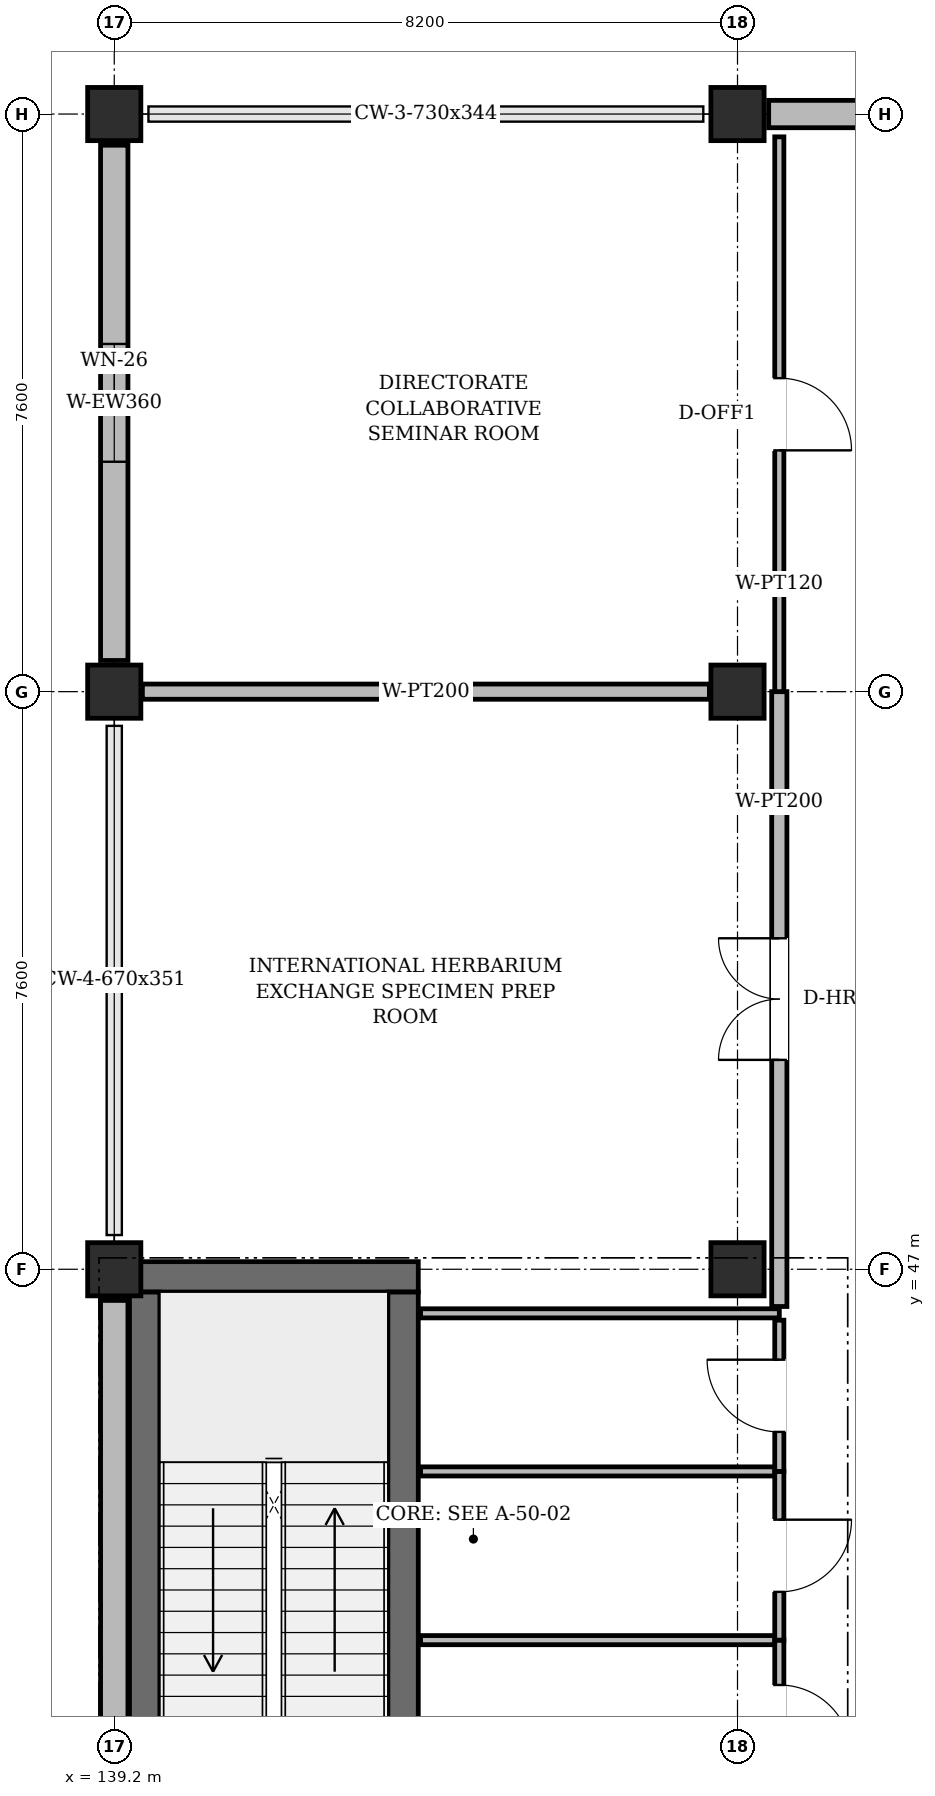
"""IFC4 building model, lengths in metres.
Left out: names, types, materials, properties, quantities, classifications, styles, units other than length and angle.
Written with IfcOpenShell. Run it as: python <this file> out.ifc"""

import sys

from ifc_helpers import new_model, si_unit, direction, frame, frame_2d, origin, origin_2d, place, context, subcontext, project, spatial, rectangle, extrude, element, fill, save


model = new_model("IFC4")
c1 = context("Model", 3, precision=1e-05, world=origin(), true_north=direction((0.0, 1.0)))
c2 = subcontext(c1, "Body", "Model", "MODEL_VIEW")
j1 = project(units=[si_unit("LENGTHUNIT", "METRE"), si_unit("PLANEANGLEUNIT", "RADIAN")], contexts=[c1])
p1 = place(None, origin())
s1 = spatial("IfcSite", under=j1, at=p1, CompositionType="ELEMENT")
p2 = place(p1, origin())
s2 = spatial("IfcBuilding", under=s1, at=p2, CompositionType="ELEMENT")
p3 = place(p2, frame((0.0, 0.0, 61.8)))
s3 = spatial("IfcBuildingStorey", under=s2, at=p3, CompositionType="ELEMENT", Elevation=61.8)
p4 = place(p3, frame((139.2, 47.0, 0.0), z_axis=(0.0, 0.0, 1.0), x_axis=(1.0, 0.0, 0.0)))
e1 = element("IfcColumn", 1, at=p4, inside=s3, PredefinedType="COLUMN", context=c2, shape_type="SweptSolid", body=[
    extrude(rectangle(XDim=0.7, YDim=0.7, at=origin_2d()), origin(), (0.0, 0.0, 1.0), 4.11),
])
for number, where, z_axis, x_axis in (
    (2, (139.2, 54.6, 0.0), (0.0, 0.0, 1.0), (1.0, 0.0, 0.0)),
    (3, (139.2, 62.2, 0.0), (0.0, 0.0, 1.0), (1.0, 0.0, 0.0)),
):
    element("IfcColumn", number, at=place(p3, frame(where, z_axis=z_axis, x_axis=x_axis)), inside=s3, PredefinedType="COLUMN", context=c2, shape_type="SweptSolid", body=[
        extrude(rectangle(XDim=0.7, YDim=0.7, at=origin_2d()), origin(), (0.0, 0.0, 1.0), 4.04),
    ])
p5 = place(p3, frame((147.4, 47.0, 0.0), z_axis=(0.0, 0.0, 1.0), x_axis=(1.0, 0.0, 0.0)))
e4 = element("IfcColumn", 4, at=p5, inside=s3, PredefinedType="COLUMN", context=c2, shape_type="SweptSolid", body=[
    extrude(rectangle(XDim=0.7, YDim=0.7, at=origin_2d()), origin(), (0.0, 0.0, 1.0), 4.11),
])
for number, where, z_axis, x_axis in (
    (5, (147.4, 54.6, 0.0), (0.0, 0.0, 1.0), (1.0, 0.0, 0.0)),
    (6, (147.4, 62.2, 0.0), (0.0, 0.0, 1.0), (1.0, 0.0, 0.0)),
):
    element("IfcColumn", number, at=place(p3, frame(where, z_axis=z_axis, x_axis=x_axis)), inside=s3, PredefinedType="COLUMN", context=c2, shape_type="SweptSolid", body=[
        extrude(rectangle(XDim=0.7, YDim=0.7, at=origin_2d()), origin(), (0.0, 0.0, 1.0), 4.04),
    ])
p6 = place(p3, frame((155.19, 62.2, 0.0), z_axis=(0.0, 0.0, 1.0), x_axis=(-1.0, 0.0, 0.0)))
e7 = element("IfcWall", 7, at=p6, inside=s3, PredefinedType="SOLIDWALL", context=c2, shape_type="SweptSolid", body=[
    extrude(rectangle(XDim=7.38, YDim=0.36, at=frame_2d((3.69, 0.0))), origin(), (0.0, 0.0, 1.0), 3.425),
])
p7 = place(p6, frame((2.365, 0.0, 0.95)))
e8 = element("IfcOpeningElement", 8, at=p7, cuts=e7, PredefinedType="OPENING", context=c2, shape_type="SweptSolid", body=[
    extrude(rectangle(XDim=2.65, YDim=2.05, at=frame_2d((1.325, 1.025))), frame((0.0, 0.192, 0.0), z_axis=(0.0, -1.0, 0.0), x_axis=(1.0, 0.0, 0.0)), (0.0, 0.0, 1.0), 0.384),
])
p8 = place(p3, frame((139.2, 61.79, 0.0), z_axis=(0.0, 0.0, 1.0), x_axis=(0.0, -1.0, 0.0)))
e9 = element("IfcWall", 9, at=p8, inside=s3, PredefinedType="SOLIDWALL", context=c2, shape_type="SweptSolid", body=[
    extrude(rectangle(XDim=6.78, YDim=0.36, at=frame_2d((3.39, 0.0))), origin(), (0.0, 0.0, 1.0), 3.425),
])
p9 = place(p8, frame((2.615, 0.0, 0.95)))
e10 = element("IfcOpeningElement", 10, at=p9, cuts=e9, PredefinedType="OPENING", context=c2, shape_type="SweptSolid", body=[
    extrude(rectangle(XDim=1.55, YDim=1.5, at=frame_2d((0.775, 0.75))), frame((0.0, 0.192, 0.0), z_axis=(0.0, -1.0, 0.0), x_axis=(1.0, 0.0, 0.0)), (0.0, 0.0, 1.0), 0.384),
])
p10 = place(p3, frame((139.2, 46.59, 0.0), z_axis=(0.0, 0.0, 1.0), x_axis=(0.0, -1.0, 0.0)))
e11 = element("IfcWall", 11, at=p10, inside=s3, PredefinedType="SOLIDWALL", context=c2, shape_type="SweptSolid", body=[
    extrude(rectangle(XDim=6.78, YDim=0.36, at=frame_2d((3.39, 0.0))), origin(), (0.0, 0.0, 1.0), 3.495),
])
p11 = place(p3, frame((139.4, 46.9, 0.0), z_axis=(0.0, 0.0, 1.0), x_axis=(1.0, 0.0, 0.0)))
e12 = element("IfcWall", 12, at=p11, inside=s3, PredefinedType="SHEAR", context=c2, shape_type="SweptSolid", body=[
    extrude(rectangle(XDim=3.8, YDim=0.4, at=frame_2d((1.9, 0.0))), origin(), (0.0, 0.0, 1.0), 4.11),
])
for number, where, z_axis, x_axis in (
    (13, (139.6, 39.7, 0.0), (0.0, 0.0, 1.0), (0.0, 1.0, 0.0)),
    (14, (143.0, 39.7, 0.0), (0.0, 0.0, 1.0), (0.0, 1.0, 0.0)),
):
    element("IfcWall", number, at=place(p3, frame(where, z_axis=z_axis, x_axis=x_axis)), inside=s3, PredefinedType="SHEAR", context=c2, shape_type="SweptSolid", body=[
        extrude(rectangle(XDim=7.0, YDim=0.4, at=frame_2d((3.5, 0.0))), origin(), (0.0, 0.0, 1.0), 4.11),
    ])
p12 = place(p3, frame((143.23, 46.42, 0.0), z_axis=(0.0, 0.0, 1.0), x_axis=(1.0, 0.0, 0.0)))
e15 = element("IfcWall", 15, at=p12, inside=s3, PredefinedType="PARTITIONING", context=c2, shape_type="SweptSolid", body=[
    extrude(rectangle(XDim=4.72, YDim=0.12, at=frame_2d((2.36, 0.0))), origin(), (0.0, 0.0, 1.0), 4.005),
])
p13 = place(p3, frame((143.23, 42.12, 0.0), z_axis=(0.0, 0.0, 1.0), x_axis=(1.0, 0.0, 0.0)))
e16 = element("IfcWall", 16, at=p13, inside=s3, PredefinedType="PARTITIONING", context=c2, shape_type="SweptSolid", body=[
    extrude(rectangle(XDim=4.72, YDim=0.12, at=frame_2d((2.36, 0.0))), origin(), (0.0, 0.0, 1.0), 3.585),
])
p14 = place(p3, frame((147.95, 42.12, 0.0), z_axis=(0.0, 0.0, 1.0), x_axis=(0.0, -1.0, 0.0)))
e17 = element("IfcWall", 17, at=p14, inside=s3, PredefinedType="PARTITIONING", context=c2, shape_type="SweptSolid", body=[
    extrude(rectangle(XDim=2.13, YDim=0.12, at=frame_2d((1.065, 0.0))), origin(), (0.0, 0.0, 1.0), 4.005),
])
p15 = place(p14, frame((0.59, 0.0, 0.0)))
e18 = element("IfcOpeningElement", 18, at=p15, cuts=e17, PredefinedType="OPENING", context=c2, shape_type="SweptSolid", body=[
    extrude(rectangle(XDim=0.95, YDim=2.15, at=frame_2d((0.475, 1.075))), frame((0.0, 0.072, 0.0), z_axis=(0.0, -1.0, 0.0), x_axis=(1.0, 0.0, 0.0)), (0.0, 0.0, 1.0), 0.144),
])
p16 = place(p3, frame((143.23, 44.34, 0.0), z_axis=(0.0, 0.0, 1.0), x_axis=(1.0, 0.0, 0.0)))
e19 = element("IfcWall", 19, at=p16, inside=s3, PredefinedType="PARTITIONING", context=c2, shape_type="SweptSolid", body=[
    extrude(rectangle(XDim=4.72, YDim=0.12, at=frame_2d((2.36, 0.0))), origin(), (0.0, 0.0, 1.0), 3.535),
])
p17 = place(p3, frame((147.95, 44.34, 0.0), z_axis=(0.0, 0.0, 1.0), x_axis=(0.0, -1.0, 0.0)))
e20 = element("IfcWall", 20, at=p17, inside=s3, PredefinedType="PARTITIONING", context=c2, shape_type="SweptSolid", body=[
    extrude(rectangle(XDim=2.22, YDim=0.12, at=frame_2d((1.11, 0.0))), origin(), (0.0, 0.0, 1.0), 4.005),
])
p18 = place(p17, frame((0.635, 0.0, 0.0)))
e21 = element("IfcOpeningElement", 21, at=p18, cuts=e20, PredefinedType="OPENING", context=c2, shape_type="SweptSolid", body=[
    extrude(rectangle(XDim=0.95, YDim=2.15, at=frame_2d((0.475, 1.075))), frame((0.0, 0.072, 0.0), z_axis=(0.0, -1.0, 0.0), x_axis=(1.0, 0.0, 0.0)), (0.0, 0.0, 1.0), 0.144),
])
p19 = place(p3, frame((147.95, 46.33, 0.0), z_axis=(0.0, 0.0, 1.0), x_axis=(0.0, -1.0, 0.0)))
e22 = element("IfcWall", 22, at=p19, inside=s3, PredefinedType="PARTITIONING", context=c2, shape_type="SweptSolid", body=[
    extrude(rectangle(XDim=1.99, YDim=0.12, at=frame_2d((0.995, 0.0))), origin(), (0.0, 0.0, 1.0), 4.005),
])
p20 = place(p19, frame((0.52, 0.0, 0.0)))
e23 = element("IfcOpeningElement", 23, at=p20, cuts=e22, PredefinedType="OPENING", context=c2, shape_type="SweptSolid", body=[
    extrude(rectangle(XDim=0.95, YDim=2.15, at=frame_2d((0.475, 1.075))), frame((0.0, 0.072, 0.0), z_axis=(0.0, -1.0, 0.0), x_axis=(1.0, 0.0, 0.0)), (0.0, 0.0, 1.0), 0.144),
])
p21 = place(p3, frame((147.95, 46.51, 0.0), z_axis=(0.0, 0.0, 1.0), x_axis=(0.0, 1.0, 0.0)))
e24 = element("IfcWall", 24, at=p21, inside=s3, PredefinedType="PARTITIONING", context=c2, shape_type="SweptSolid", body=[
    extrude(rectangle(XDim=8.09, YDim=0.2, at=frame_2d((4.045, 0.0))), origin(), (0.0, 0.0, 1.0), 4.005),
])
p22 = place(p21, frame((3.245, 0.0, 0.0)))
e25 = element("IfcOpeningElement", 25, at=p22, cuts=e24, PredefinedType="OPENING", context=c2, shape_type="SweptSolid", body=[
    extrude(rectangle(XDim=1.6, YDim=2.3, at=frame_2d((0.8, 1.15))), frame((0.0, 0.112, 0.0), z_axis=(0.0, -1.0, 0.0), x_axis=(1.0, 0.0, 0.0)), (0.0, 0.0, 1.0), 0.224),
])
p23 = place(p3, frame((147.95, 54.6, 0.0), z_axis=(0.0, 0.0, 1.0), x_axis=(0.0, 1.0, 0.0)))
e26 = element("IfcWall", 26, at=p23, inside=s3, PredefinedType="PARTITIONING", context=c2, shape_type="SweptSolid", body=[
    extrude(rectangle(XDim=7.3, YDim=0.12, at=frame_2d((3.65, 0.0))), origin(), (0.0, 0.0, 1.0), 4.005),
])
p24 = place(p23, frame((3.175, 0.0, 0.0)))
e27 = element("IfcOpeningElement", 27, at=p24, cuts=e26, PredefinedType="OPENING", context=c2, shape_type="SweptSolid", body=[
    extrude(rectangle(XDim=0.95, YDim=2.2, at=frame_2d((0.475, 1.1))), frame((0.0, 0.072, 0.0), z_axis=(0.0, -1.0, 0.0), x_axis=(1.0, 0.0, 0.0)), (0.0, 0.0, 1.0), 0.144),
])
p25 = place(p3, frame((139.57, 54.6, 0.0), z_axis=(0.0, 0.0, 1.0), x_axis=(1.0, 0.0, 0.0)))
e28 = element("IfcWall", 28, at=p25, inside=s3, PredefinedType="PARTITIONING", context=c2, shape_type="SweptSolid", body=[
    extrude(rectangle(XDim=7.46, YDim=0.2, at=frame_2d((3.73, 0.0))), origin(), (0.0, 0.0, 1.0), 3.375),
])
p26 = place(p9, origin())
e29 = element("IfcWindow", 29, at=p26, inside=s3, PartitioningType="DOUBLE_PANEL_VERTICAL", PredefinedType="WINDOW", context=c2, shape_type="SweptSolid", body=[
    extrude(rectangle(XDim=1.55, YDim=1.5, at=frame_2d((0.775, 0.75))), frame((0.0, 0.03, 0.0), z_axis=(0.0, -1.0, 0.0), x_axis=(1.0, 0.0, 0.0)), (0.0, 0.0, 1.0), 0.06),
])
fill(e10, e29)
p27 = place(p15, origin())
e30 = element("IfcDoor", 30, at=p27, inside=s3, OperationType="SINGLE_SWING_RIGHT", PredefinedType="DOOR", context=c2, shape_type="SweptSolid", body=[
    extrude(rectangle(XDim=0.95, YDim=2.15, at=frame_2d((0.475, 1.075))), frame((0.0, 0.025, 0.0), z_axis=(0.0, -1.0, 0.0), x_axis=(1.0, 0.0, 0.0)), (0.0, 0.0, 1.0), 0.05),
])
fill(e18, e30)
p28 = place(p18, origin())
e31 = element("IfcDoor", 31, at=p28, inside=s3, OperationType="SINGLE_SWING_LEFT", PredefinedType="DOOR", context=c2, shape_type="SweptSolid", body=[
    extrude(rectangle(XDim=0.95, YDim=2.15, at=frame_2d((0.475, 1.075))), frame((0.0, 0.025, 0.0), z_axis=(0.0, -1.0, 0.0), x_axis=(1.0, 0.0, 0.0)), (0.0, 0.0, 1.0), 0.05),
])
fill(e21, e31)
p29 = place(p20, frame((0.95, 0.0, 0.0), z_axis=(0.0, 0.0, 1.0), x_axis=(-1.0, 0.0, 0.0)))
e32 = element("IfcDoor", 32, at=p29, inside=s3, OperationType="SINGLE_SWING_RIGHT", PredefinedType="DOOR", context=c2, shape_type="SweptSolid", body=[
    extrude(rectangle(XDim=0.95, YDim=2.15, at=frame_2d((0.475, 1.075))), frame((0.0, 0.025, 0.0), z_axis=(0.0, -1.0, 0.0), x_axis=(1.0, 0.0, 0.0)), (0.0, 0.0, 1.0), 0.05),
])
fill(e23, e32)
p30 = place(p22, origin())
e33 = element("IfcDoor", 33, at=p30, inside=s3, OperationType="DOUBLE_DOOR_SINGLE_SWING", PredefinedType="DOOR", context=c2, shape_type="SweptSolid", body=[
    extrude(rectangle(XDim=1.6, YDim=2.3, at=frame_2d((0.8, 1.15))), frame((0.0, 0.025, 0.0), z_axis=(0.0, -1.0, 0.0), x_axis=(1.0, 0.0, 0.0)), (0.0, 0.0, 1.0), 0.05),
])
fill(e25, e33)
p31 = place(p24, frame((0.95, 0.0, 0.0), z_axis=(0.0, 0.0, 1.0), x_axis=(-1.0, 0.0, 0.0)))
e34 = element("IfcDoor", 34, at=p31, inside=s3, OperationType="SINGLE_SWING_RIGHT", PredefinedType="DOOR", context=c2, shape_type="SweptSolid", body=[
    extrude(rectangle(XDim=0.95, YDim=2.2, at=frame_2d((0.475, 1.1))), frame((0.0, 0.025, 0.0), z_axis=(0.0, -1.0, 0.0), x_axis=(1.0, 0.0, 0.0)), (0.0, 0.0, 1.0), 0.05),
])
fill(e27, e34)
save(model, sys.argv[1])
